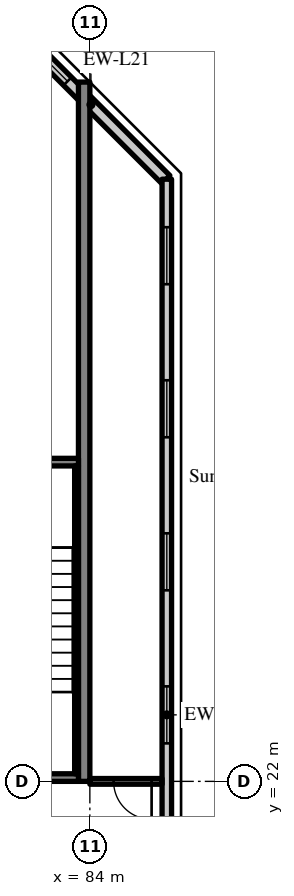
"""IFC4 building model, lengths in metres.
Left out: names, types, materials, properties, quantities, classifications, styles, units other than length and angle.
Written with IfcOpenShell. Run it as: python <this file> out.ifc"""

import sys

from ifc_helpers import new_model, si_unit, direction, frame, frame_2d, origin, place, context, subcontext, project, spatial, rectangle, extrude, source, transform, mapped, element, fill, save


model = new_model("IFC4")
c1 = context("Model", 3, precision=1e-05, world=origin(), true_north=direction((0.0, 1.0)))
c2 = subcontext(c1, "Body", "Model", "MODEL_VIEW")
j1 = project(units=[si_unit("LENGTHUNIT", "METRE"), si_unit("PLANEANGLEUNIT", "RADIAN")], contexts=[c1])
p1 = place(None, origin())
s1 = spatial("IfcSite", under=j1, at=p1, CompositionType="ELEMENT")
p2 = place(p1, origin())
s2 = spatial("IfcBuilding", under=s1, at=p2, CompositionType="ELEMENT")
p3 = place(p2, frame((0.0, 0.0, 241.3)))
s3 = spatial("IfcBuildingStorey", under=s2, at=p3, CompositionType="ELEMENT", Elevation=241.3)
m1 = source(origin(), c2, "Body", "SweptSolid", [
    extrude(rectangle(XDim=18.4, YDim=0.3, at=frame_2d((9.2, 0.0))), origin(), (0.0, 0.0, 1.0), 3.62),
])
p4 = place(p3, frame((83.85, 22.0, 0.0), z_axis=(0.0, 0.0, 1.0), x_axis=(0.0, 1.0, 0.0)))
e1 = element("IfcWall", 1, at=p4, inside=s3, PredefinedType="SHEAR", context=c2, shape_type="MappedRepresentation", body=[
    mapped(m1, transform((0.0, 0.0, 0.0), scale=1.0)),
])
m2 = source(origin(), c2, "Body", "SweptSolid", [
    extrude(rectangle(XDim=5.576, YDim=0.3, at=frame_2d((2.788, 0.0))), origin(), (0.0, 0.0, 1.0), 3.62),
])
p5 = place(p3, frame((86.0, 37.834, 0.0), z_axis=(0.0, 0.0, 1.0), x_axis=(-0.707106781187, 0.707106781187, 0.0)))
e2 = element("IfcWall", 2, at=p5, inside=s3, PredefinedType="SOLIDWALL", context=c2, shape_type="MappedRepresentation", body=[
    mapped(m2, transform((0.0, 0.0, 0.0), scale=1.0)),
])
m3 = source(origin(), c2, "Body", "SweptSolid", [
    extrude(rectangle(XDim=1.8, YDim=1.5, at=frame_2d((0.9, 0.75))), frame((0.0, 0.16, 0.0), z_axis=(0.0, -1.0, 0.0), x_axis=(1.0, 0.0, 0.0)), (0.0, 0.0, 1.0), 0.32),
])
p6 = place(p5, frame((3.658, 0.0, 0.9)))
e3 = element("IfcOpeningElement", 3, at=p6, cuts=e2, PredefinedType="OPENING", context=c2, shape_type="MappedRepresentation", body=[
    mapped(m3, transform((0.0, 0.0, 0.0), scale=1.0)),
])
m4 = source(origin(), c2, "Body", "SweptSolid", [
    extrude(rectangle(XDim=28.189, YDim=0.25, at=frame_2d((14.095, 0.0))), origin(), (0.0, 0.0, 1.0), 3.62),
])
p7 = place(p3, frame((86.025, 9.655, 0.0), z_axis=(0.0, 0.0, 1.0), x_axis=(0.0, 1.0, 0.0)))
e4 = element("IfcWall", 4, at=p7, inside=s3, PredefinedType="SOLIDWALL", context=c2, shape_type="MappedRepresentation", body=[
    mapped(m4, transform((0.0, 0.0, 0.0), scale=1.0)),
])
m5 = source(origin(), c2, "Body", "SweptSolid", [
    extrude(rectangle(XDim=1.5, YDim=1.5, at=frame_2d((0.75, 0.75))), frame((0.0, 0.135, 0.0), z_axis=(0.0, -1.0, 0.0), x_axis=(1.0, 0.0, 0.0)), (0.0, 0.0, 1.0), 0.27),
])
p8 = place(p7, frame((1.263, 0.0, 0.9)))
e5 = element("IfcOpeningElement", 5, at=p8, cuts=e4, PredefinedType="OPENING", context=c2, shape_type="MappedRepresentation", body=[
    mapped(m5, transform((0.0, 0.0, 0.0), scale=1.0)),
])
p9 = place(p7, frame((5.291, 0.0, 0.9)))
e6 = element("IfcOpeningElement", 6, at=p9, cuts=e4, PredefinedType="OPENING", context=c2, shape_type="MappedRepresentation", body=[
    mapped(m5, transform((0.0, 0.0, 0.0), scale=1.0)),
])
p10 = place(p7, frame((9.318, 0.0, 0.9)))
e7 = element("IfcOpeningElement", 7, at=p10, cuts=e4, PredefinedType="OPENING", context=c2, shape_type="MappedRepresentation", body=[
    mapped(m5, transform((0.0, 0.0, 0.0), scale=1.0)),
])
p11 = place(p7, frame((13.345, 0.0, 0.9)))
e8 = element("IfcOpeningElement", 8, at=p11, cuts=e4, PredefinedType="OPENING", context=c2, shape_type="MappedRepresentation", body=[
    mapped(m5, transform((0.0, 0.0, 0.0), scale=1.0)),
])
p12 = place(p7, frame((17.372, 0.0, 0.9)))
e9 = element("IfcOpeningElement", 9, at=p12, cuts=e4, PredefinedType="OPENING", context=c2, shape_type="MappedRepresentation", body=[
    mapped(m5, transform((0.0, 0.0, 0.0), scale=1.0)),
])
p13 = place(p7, frame((21.399, 0.0, 0.9)))
e10 = element("IfcOpeningElement", 10, at=p13, cuts=e4, PredefinedType="OPENING", context=c2, shape_type="MappedRepresentation", body=[
    mapped(m5, transform((0.0, 0.0, 0.0), scale=1.0)),
])
p14 = place(p7, frame((25.426, 0.0, 0.9)))
e11 = element("IfcOpeningElement", 11, at=p14, cuts=e4, PredefinedType="OPENING", context=c2, shape_type="MappedRepresentation", body=[
    mapped(m5, transform((0.0, 0.0, 0.0), scale=1.0)),
])
m6 = source(origin(), c2, "Body", "SweptSolid", [
    extrude(rectangle(XDim=8.1, YDim=0.2, at=frame_2d((4.05, 0.0))), origin(), (0.0, 0.0, 1.0), 3.62),
])
p15 = place(p3, frame((83.7, 22.1, 0.0), z_axis=(0.0, 0.0, 1.0), x_axis=(-1.0, 0.0, 0.0)))
e12 = element("IfcWall", 12, at=p15, inside=s3, PredefinedType="SOLIDWALL", context=c2, shape_type="MappedRepresentation", body=[
    mapped(m6, transform((0.0, 0.0, 0.0), scale=1.0)),
])
m7 = source(origin(), c2, "Body", "SweptSolid", [
    extrude(rectangle(XDim=1.2, YDim=2.1, at=frame_2d((0.6, 1.05))), frame((0.0, 0.11, 0.0), z_axis=(0.0, -1.0, 0.0), x_axis=(1.0, 0.0, 0.0)), (0.0, 0.0, 1.0), 0.22),
])
p16 = place(p15, frame((5.9, 0.0, 0.0)))
e13 = element("IfcOpeningElement", 13, at=p16, cuts=e12, PredefinedType="OPENING", context=c2, shape_type="MappedRepresentation", body=[
    mapped(m7, transform((0.0, 0.0, 0.0), scale=1.0)),
])
p17 = place(p3, frame((83.7, 30.4, 0.0), z_axis=(0.0, 0.0, 1.0), x_axis=(-1.0, 0.0, 0.0)))
e14 = element("IfcWall", 14, at=p17, inside=s3, PredefinedType="SOLIDWALL", context=c2, shape_type="MappedRepresentation", body=[
    mapped(m6, transform((0.0, 0.0, 0.0), scale=1.0)),
])
m8 = source(origin(), c2, "Body", "SweptSolid", [
    extrude(rectangle(XDim=1.0, YDim=2.1, at=frame_2d((0.5, 1.05))), frame((0.0, 0.11, 0.0), z_axis=(0.0, -1.0, 0.0), x_axis=(1.0, 0.0, 0.0)), (0.0, 0.0, 1.0), 0.22),
])
p18 = place(p17, frame((6.0, 0.0, 0.0)))
e15 = element("IfcOpeningElement", 15, at=p18, cuts=e14, PredefinedType="OPENING", context=c2, shape_type="MappedRepresentation", body=[
    mapped(m8, transform((0.0, 0.0, 0.0), scale=1.0)),
])
m9 = source(origin(), c2, "Body", "SweptSolid", [
    extrude(rectangle(XDim=8.1, YDim=0.1, at=frame_2d((4.05, 0.0))), origin(), (0.0, 0.0, 1.0), 3.62),
])
p19 = place(p3, frame((83.65, 22.2, 0.0), z_axis=(0.0, 0.0, 1.0), x_axis=(0.0, 1.0, 0.0)))
e16 = element("IfcWall", 16, at=p19, inside=s3, PredefinedType="SOLIDWALL", context=c2, shape_type="MappedRepresentation", body=[
    mapped(m9, transform((0.0, 0.0, 0.0), scale=1.0)),
])
m10 = source(origin(), c2, "Body", "SweptSolid", [
    extrude(rectangle(XDim=1.9, YDim=0.15, at=frame_2d((0.95, 0.0))), origin(), (0.0, 0.0, 1.0), 2.92),
])
p20 = place(p3, frame((84.0, 22.0, 0.0), z_axis=(0.0, 0.0, 1.0), x_axis=(1.0, 0.0, 0.0)))
e17 = element("IfcWall", 17, at=p20, inside=s3, PredefinedType="PARTITIONING", context=c2, shape_type="MappedRepresentation", body=[
    mapped(m10, transform((0.0, 0.0, 0.0), scale=1.0)),
])
m11 = source(origin(), c2, "Body", "SweptSolid", [
    extrude(rectangle(XDim=1.0, YDim=2.1, at=frame_2d((0.5, 1.05))), frame((0.0, 0.085, 0.0), z_axis=(0.0, -1.0, 0.0), x_axis=(1.0, 0.0, 0.0)), (0.0, 0.0, 1.0), 0.17),
])
p21 = place(p20, frame((0.625, 0.0, 0.0)))
e18 = element("IfcOpeningElement", 18, at=p21, cuts=e17, PredefinedType="OPENING", context=c2, shape_type="MappedRepresentation", body=[
    mapped(m11, transform((0.0, 0.0, 0.0), scale=1.0)),
])
m12 = source(origin(), c2, "Body", "SweptSolid", [
    extrude(rectangle(XDim=1.8, YDim=1.5, at=frame_2d((0.9, 0.75))), frame((0.0, 0.03, 0.0), z_axis=(0.0, -1.0, 0.0), x_axis=(1.0, 0.0, 0.0)), (0.0, 0.0, 1.0), 0.06),
])
p22 = place(p6, origin())
e19 = element("IfcWindow", 19, at=p22, inside=s3, PartitioningType="SINGLE_PANEL", PredefinedType="WINDOW", context=c2, shape_type="MappedRepresentation", body=[
    mapped(m12, transform((0.0, 0.0, 0.0), scale=1.0)),
])
fill(e3, e19)
m13 = source(origin(), c2, "Body", "SweptSolid", [
    extrude(rectangle(XDim=1.5, YDim=1.5, at=frame_2d((0.75, 0.75))), frame((0.0, 0.03, 0.0), z_axis=(0.0, -1.0, 0.0), x_axis=(1.0, 0.0, 0.0)), (0.0, 0.0, 1.0), 0.06),
])
p23 = place(p11, origin())
e20 = element("IfcWindow", 20, at=p23, inside=s3, PartitioningType="SINGLE_PANEL", PredefinedType="WINDOW", context=c2, shape_type="MappedRepresentation", body=[
    mapped(m13, transform((0.0, 0.0, 0.0), scale=1.0)),
])
fill(e8, e20)
p24 = place(p12, origin())
e21 = element("IfcWindow", 21, at=p24, inside=s3, PartitioningType="SINGLE_PANEL", PredefinedType="WINDOW", context=c2, shape_type="MappedRepresentation", body=[
    mapped(m13, transform((0.0, 0.0, 0.0), scale=1.0)),
])
fill(e9, e21)
p25 = place(p13, origin())
e22 = element("IfcWindow", 22, at=p25, inside=s3, PartitioningType="SINGLE_PANEL", PredefinedType="WINDOW", context=c2, shape_type="MappedRepresentation", body=[
    mapped(m13, transform((0.0, 0.0, 0.0), scale=1.0)),
])
fill(e10, e22)
p26 = place(p14, origin())
e23 = element("IfcWindow", 23, at=p26, inside=s3, PartitioningType="SINGLE_PANEL", PredefinedType="WINDOW", context=c2, shape_type="MappedRepresentation", body=[
    mapped(m13, transform((0.0, 0.0, 0.0), scale=1.0)),
])
fill(e11, e23)
m14 = source(origin(), c2, "Body", "SweptSolid", [
    extrude(rectangle(XDim=1.0, YDim=2.1, at=frame_2d((0.5, 1.05))), frame((0.0, 0.025, 0.0), z_axis=(0.0, -1.0, 0.0), x_axis=(1.0, 0.0, 0.0)), (0.0, 0.0, 1.0), 0.05),
])
p27 = place(p21, origin())
e24 = element("IfcDoor", 24, at=p27, inside=s3, OperationType="SINGLE_SWING_RIGHT", PredefinedType="DOOR", context=c2, shape_type="MappedRepresentation", body=[
    mapped(m14, transform((0.0, 0.0, 0.0), scale=1.0)),
])
fill(e18, e24)
save(model, sys.argv[1])
